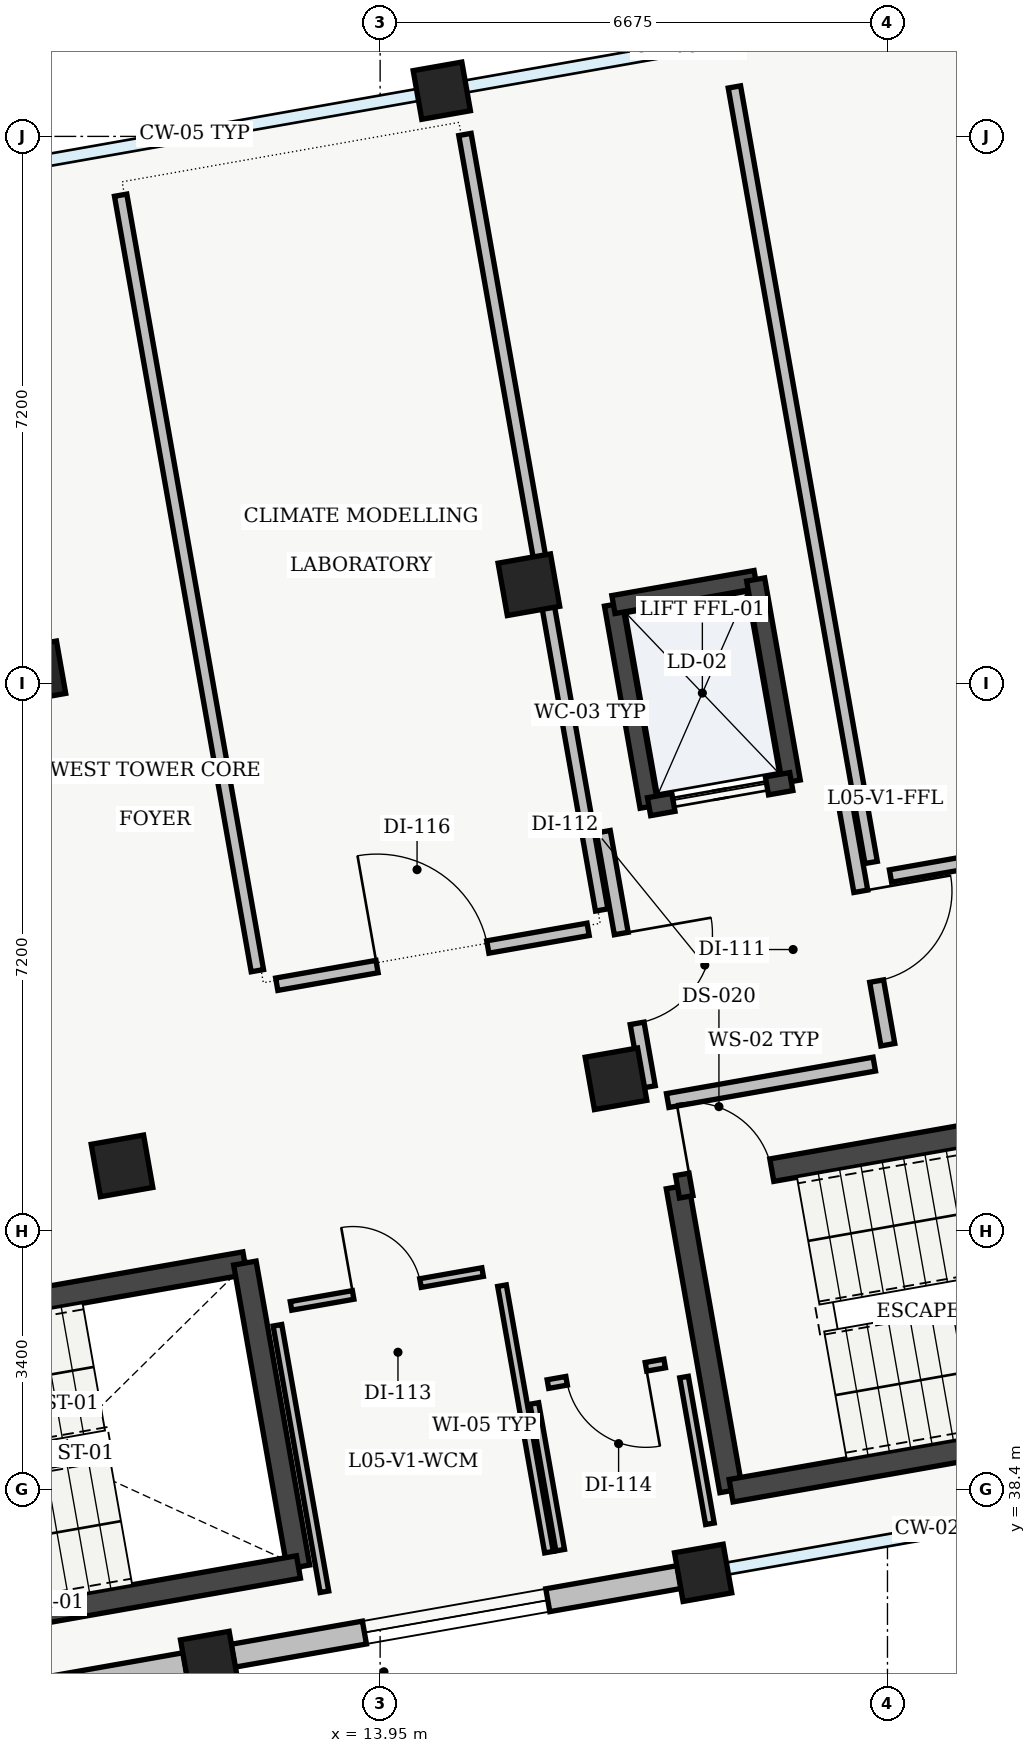
"""IFC4 building model, lengths in metres.
Left out: names, types, materials, properties, quantities, classifications, styles, units other than length and angle.
Written with IfcOpenShell. Run it as: python <this file> out.ifc"""

import sys

from ifc_helpers import new_model, si_unit, direction, frame, frame_2d, origin, origin_2d, place, context, subcontext, project, spatial, rectangle, extrude, element, fill, save


model = new_model("IFC4")
c1 = context("Model", 3, precision=1e-05, world=origin(), true_north=direction((0.0, 1.0)))
c2 = subcontext(c1, "Body", "Model", "MODEL_VIEW")
j1 = project(units=[si_unit("LENGTHUNIT", "METRE"), si_unit("PLANEANGLEUNIT", "RADIAN")], contexts=[c1])
p1 = place(None, origin())
s1 = spatial("IfcSite", under=j1, at=p1, CompositionType="ELEMENT")
p2 = place(p1, origin())
s2 = spatial("IfcBuilding", under=s1, at=p2, CompositionType="ELEMENT")
p3 = place(p2, frame((0.0, 0.0, 23.1)))
s3 = spatial("IfcBuildingStorey", under=s2, at=p3, CompositionType="ELEMENT", Elevation=23.1)
p4 = place(p3, frame((11.7, 36.156, 0.0), z_axis=(0.0, 0.0, 1.0), x_axis=(0.984807753012, 0.173648177667, 0.0)))
e1 = element("IfcColumn", 1, at=p4, inside=s3, PredefinedType="COLUMN", context=c2, shape_type="SweptSolid", body=[
    extrude(rectangle(XDim=0.65, YDim=0.65, at=origin_2d()), origin(), (0.0, 0.0, 1.0), 4.31),
])
for number, where, z_axis, x_axis in (
    (2, (10.554, 42.656, 0.0), (0.0, 0.0, 1.0), (0.985, 0.174, 0.0)),
    (3, (9.407, 49.156, 0.0), (0.0, 0.0, 1.0), (0.985, 0.174, 0.0)),
):
    element("IfcColumn", number, at=place(p3, frame(where, z_axis=z_axis, x_axis=x_axis)), inside=s3, PredefinedType="COLUMN", context=c2, shape_type="SweptSolid", body=[
        extrude(rectangle(XDim=0.7, YDim=0.7, at=origin_2d()), origin(), (0.0, 0.0, 1.0), 4.31),
    ])
p5 = place(p3, frame((18.199, 37.302, 0.0), z_axis=(0.0, 0.0, 1.0), x_axis=(0.984807753012, 0.173648177667, 0.0)))
e4 = element("IfcColumn", 4, at=p5, inside=s3, PredefinedType="COLUMN", context=c2, shape_type="SweptSolid", body=[
    extrude(rectangle(XDim=0.65, YDim=0.65, at=origin_2d()), origin(), (0.0, 0.0, 1.0), 4.31),
])
for number, where, z_axis, x_axis in (
    (5, (17.053, 43.802, 0.0), (0.0, 0.0, 1.0), (0.985, 0.174, 0.0)),
    (6, (15.907, 50.302, 0.0), (0.0, 0.0, 1.0), (0.985, 0.174, 0.0)),
):
    element("IfcColumn", number, at=place(p3, frame(where, z_axis=z_axis, x_axis=x_axis)), inside=s3, PredefinedType="COLUMN", context=c2, shape_type="SweptSolid", body=[
        extrude(rectangle(XDim=0.7, YDim=0.7, at=origin_2d()), origin(), (0.0, 0.0, 1.0), 4.31),
    ])
p6 = place(p3, frame((14.761, 56.801, 0.0), z_axis=(0.0, 0.0, 1.0), x_axis=(0.984807753012, 0.173648177667, 0.0)))
e7 = element("IfcColumn", 7, at=p6, inside=s3, PredefinedType="COLUMN", context=c2, shape_type="SweptSolid", body=[
    extrude(rectangle(XDim=0.65, YDim=0.65, at=origin_2d()), origin(), (0.0, 0.0, 1.0), 4.31),
])
p7 = place(p3, frame((17.884, 37.247, 0.0), z_axis=(0.0, 0.0, 1.0), x_axis=(-0.98480829201, -0.173645120828, 0.0)))
e8 = element("IfcWall", 8, at=p7, inside=s3, PredefinedType="STANDARD", context=c2, shape_type="SweptSolid", body=[
    extrude(rectangle(XDim=5.96, YDim=0.305, at=frame_2d((2.98, 0.0))), origin(), (0.0, 0.0, 1.0), 3.795),
])
p8 = place(p7, frame((1.755, 0.0, 0.95)))
e9 = element("IfcOpeningElement", 9, at=p8, cuts=e8, PredefinedType="OPENING", context=c2, shape_type="SweptSolid", body=[
    extrude(rectangle(XDim=2.45, YDim=1.38, at=frame_2d((1.225, 0.69))), frame((0.0, 0.152, 0.0), z_axis=(0.0, -1.0, 0.0), x_axis=(1.0, 0.0, 0.0)), (0.0, 0.0, 1.0), 0.305),
])
p9 = place(p3, frame((11.385, 36.101, 0.0), z_axis=(0.0, 0.0, 1.0), x_axis=(-0.98480829201, -0.173645120828, 0.0)))
e10 = element("IfcWall", 10, at=p9, inside=s3, PredefinedType="STANDARD", context=c2, shape_type="SweptSolid", body=[
    extrude(rectangle(XDim=5.96, YDim=0.305, at=frame_2d((2.98, 0.0))), origin(), (0.0, 0.0, 1.0), 3.795),
])
p10 = place(p3, frame((4.814, 40.08, 0.0), z_axis=(0.0, 0.0, 1.0), x_axis=(0.984802636214, 0.173677193974, 0.0)))
e11 = element("IfcWall", 11, at=p10, inside=s3, PredefinedType="SHEAR", context=c2, shape_type="SweptSolid", body=[
    extrude(rectangle(XDim=7.47, YDim=0.3, at=frame_2d((3.735, 0.0))), origin(), (0.0, 0.0, 1.0), 4.28),
])
p11 = place(p10, frame((0.18, 0.0, 0.0)))
e12 = element("IfcOpeningElement", 12, at=p11, cuts=e11, PredefinedType="OPENING", context=c2, shape_type="SweptSolid", body=[
    extrude(rectangle(XDim=1.18, YDim=2.15, at=frame_2d((0.59, 1.075))), frame((0.0, 0.15, 0.0), z_axis=(0.0, -1.0, 0.0), x_axis=(1.0, 0.0, 0.0)), (0.0, 0.0, 1.0), 0.3),
])
p12 = place(p3, frame((12.17, 41.377, 0.0), z_axis=(0.0, 0.0, 1.0), x_axis=(0.173654983803, -0.984806552883, 0.0)))
e13 = element("IfcWall", 13, at=p12, inside=s3, PredefinedType="SHEAR", context=c2, shape_type="SweptSolid", body=[
    extrude(rectangle(XDim=4.06, YDim=0.3, at=frame_2d((2.03, 0.0))), origin(), (0.0, 0.0, 1.0), 4.28),
])
p13 = place(p3, frame((12.875, 37.379, 0.0), z_axis=(0.0, 0.0, 1.0), x_axis=(-0.984808225754, -0.173645496596, 0.0)))
e14 = element("IfcWall", 14, at=p13, inside=s3, PredefinedType="SHEAR", context=c2, shape_type="SweptSolid", body=[
    extrude(rectangle(XDim=7.47, YDim=0.3, at=frame_2d((3.735, 0.0))), origin(), (0.0, 0.0, 1.0), 4.28),
])
p14 = place(p3, frame((18.567, 38.383, 0.0), z_axis=(0.0, 0.0, 1.0), x_axis=(-0.173606946886, 0.984815022221, 0.0)))
e15 = element("IfcWall", 15, at=p14, inside=s3, PredefinedType="SHEAR", context=c2, shape_type="SweptSolid", body=[
    extrude(rectangle(XDim=4.06, YDim=0.3, at=frame_2d((2.03, 0.0))), origin(), (0.0, 0.0, 1.0), 4.28),
])
p15 = place(p3, frame((17.863, 42.381, 0.0), z_axis=(0.0, 0.0, 1.0), x_axis=(0.984808225754, 0.173645496596, 0.0)))
e16 = element("IfcWall", 16, at=p15, inside=s3, PredefinedType="SHEAR", context=c2, shape_type="SweptSolid", body=[
    extrude(rectangle(XDim=7.47, YDim=0.3, at=frame_2d((3.735, 0.0))), origin(), (0.0, 0.0, 1.0), 4.28),
])
p16 = place(p15, frame((0.18, 0.0, 0.0)))
e17 = element("IfcOpeningElement", 17, at=p16, cuts=e16, PredefinedType="OPENING", context=c2, shape_type="SweptSolid", body=[
    extrude(rectangle(XDim=1.08, YDim=2.15, at=frame_2d((0.54, 1.075))), frame((0.0, 0.15, 0.0), z_axis=(0.0, -1.0, 0.0), x_axis=(1.0, 0.0, 0.0)), (0.0, 0.0, 1.0), 0.3),
])
p17 = place(p3, frame((25.924, 39.68, 0.0), z_axis=(0.0, 0.0, 1.0), x_axis=(-0.984809211193, -0.173639907711, 0.0)))
e18 = element("IfcWall", 18, at=p17, inside=s3, PredefinedType="SHEAR", context=c2, shape_type="SweptSolid", body=[
    extrude(rectangle(XDim=7.47, YDim=0.3, at=frame_2d((3.735, 0.0))), origin(), (0.0, 0.0, 1.0), 4.28),
])
p18 = place(p3, frame((17.488, 47.382, 0.0), z_axis=(0.0, 0.0, 1.0), x_axis=(-0.173615102578, 0.98481358447, 0.0)))
e19 = element("IfcWall", 19, at=p18, inside=s3, PredefinedType="SHEAR", context=c2, shape_type="SweptSolid", body=[
    extrude(rectangle(XDim=2.7, YDim=0.24, at=frame_2d((1.35, 0.0))), origin(), (0.0, 0.0, 1.0), 4.28),
])
p19 = place(p3, frame((17.02, 50.041, 0.0), z_axis=(0.0, 0.0, 1.0), x_axis=(0.984815882103, 0.173602068988, 0.0)))
e20 = element("IfcWall", 20, at=p19, inside=s3, PredefinedType="SHEAR", context=c2, shape_type="SweptSolid", body=[
    extrude(rectangle(XDim=1.9, YDim=0.24, at=frame_2d((0.95, 0.0))), origin(), (0.0, 0.0, 1.0), 4.28),
])
p20 = place(p3, frame((18.891, 50.371, 0.0), z_axis=(0.0, 0.0, 1.0), x_axis=(0.173615102578, -0.98481358447, 0.0)))
e21 = element("IfcWall", 21, at=p20, inside=s3, PredefinedType="SHEAR", context=c2, shape_type="SweptSolid", body=[
    extrude(rectangle(XDim=2.7, YDim=0.24, at=frame_2d((1.35, 0.0))), origin(), (0.0, 0.0, 1.0), 4.28),
])
p21 = place(p3, frame((19.359, 47.712, 0.0), z_axis=(0.0, 0.0, 1.0), x_axis=(-0.984815882103, -0.173602068988, 0.0)))
e22 = element("IfcWall", 22, at=p21, inside=s3, PredefinedType="SHEAR", context=c2, shape_type="SweptSolid", body=[
    extrude(rectangle(XDim=1.9, YDim=0.24, at=frame_2d((0.95, 0.0))), origin(), (0.0, 0.0, 1.0), 4.28),
])
p22 = place(p21, frame((0.325, 0.0, 0.0)))
e23 = element("IfcOpeningElement", 23, at=p22, cuts=e22, PredefinedType="OPENING", context=c2, shape_type="SweptSolid", body=[
    extrude(rectangle(XDim=1.25, YDim=2.2, at=frame_2d((0.625, 1.1))), frame((0.0, 0.12, 0.0), z_axis=(0.0, -1.0, 0.0), x_axis=(1.0, 0.0, 0.0)), (0.0, 0.0, 1.0), 0.24),
])
p23 = place(p3, frame((17.733, 43.516, 0.0), z_axis=(0.0, 0.0, 1.0), x_axis=(0.984808483292, 0.173644035992, 0.0)))
e24 = element("IfcWall", 24, at=p23, inside=s3, PredefinedType="SOLIDWALL", context=c2, shape_type="SweptSolid", body=[
    extrude(rectangle(XDim=2.76, YDim=0.185, at=frame_2d((1.38, 0.0))), origin(), (0.0, 0.0, 1.0), 3.95),
])
p24 = place(p3, frame((20.63, 44.25, 0.0), z_axis=(0.0, 0.0, 1.0), x_axis=(-0.173621956536, 0.984812376145, 0.0)))
e25 = element("IfcWall", 25, at=p24, inside=s3, PredefinedType="SOLIDWALL", context=c2, shape_type="SweptSolid", body=[
    extrude(rectangle(XDim=3.41, YDim=0.185, at=frame_2d((1.705, 0.0))), origin(), (0.0, 0.0, 1.0), 3.95),
])
p25 = place(p24, frame((0.85, 0.0, 0.0)))
e26 = element("IfcOpeningElement", 26, at=p25, cuts=e25, PredefinedType="OPENING", context=c2, shape_type="SweptSolid", body=[
    extrude(rectangle(XDim=1.2, YDim=2.15, at=frame_2d((0.6, 1.075))), frame((0.0, 0.093, 0.0), z_axis=(0.0, -1.0, 0.0), x_axis=(1.0, 0.0, 0.0)), (0.0, 0.0, 1.0), 0.185),
])
p26 = place(p3, frame((16.886, 47.052, 0.0), z_axis=(0.0, 0.0, 1.0), x_axis=(0.173621956536, -0.984812376145, 0.0)))
e27 = element("IfcWall", 27, at=p26, inside=s3, PredefinedType="SOLIDWALL", context=c2, shape_type="SweptSolid", body=[
    extrude(rectangle(XDim=3.41, YDim=0.185, at=frame_2d((1.705, 0.0))), origin(), (0.0, 0.0, 1.0), 3.95),
])
p27 = place(p26, frame((1.36, 0.0, 0.0)))
e28 = element("IfcOpeningElement", 28, at=p27, cuts=e27, PredefinedType="OPENING", context=c2, shape_type="SweptSolid", body=[
    extrude(rectangle(XDim=1.2, YDim=2.15, at=frame_2d((0.6, 1.075))), frame((0.0, 0.093, 0.0), z_axis=(0.0, -1.0, 0.0), x_axis=(1.0, 0.0, 0.0)), (0.0, 0.0, 1.0), 0.185),
])
p28 = place(p3, frame((16.171, 37.574, 0.0), z_axis=(0.0, 0.0, 1.0), x_axis=(-0.173644490041, 0.984808403233, 0.0)))
e29 = element("IfcWall", 29, at=p28, inside=s3, PredefinedType="PARTITIONING", context=c2, shape_type="SweptSolid", body=[
    extrude(rectangle(XDim=3.56, YDim=0.115, at=frame_2d((1.78, 0.0))), origin(), (0.0, 0.0, 1.0), 3.95),
])
p29 = place(p3, frame((15.298, 41.259, 0.0), z_axis=(0.0, 0.0, 1.0), x_axis=(-0.984803714572, -0.17367107924, 0.0)))
e30 = element("IfcWall", 30, at=p29, inside=s3, PredefinedType="PARTITIONING", context=c2, shape_type="SweptSolid", body=[
    extrude(rectangle(XDim=2.56, YDim=0.115, at=frame_2d((1.28, 0.0))), origin(), (0.0, 0.0, 1.0), 3.95),
])
p30 = place(p29, frame((0.83, 0.0, 0.0)))
e31 = element("IfcOpeningElement", 31, at=p30, cuts=e30, PredefinedType="OPENING", context=c2, shape_type="SweptSolid", body=[
    extrude(rectangle(XDim=0.9, YDim=2.1, at=frame_2d((0.45, 1.05))), frame((0.0, 0.058, 0.0), z_axis=(0.0, -1.0, 0.0), x_axis=(1.0, 0.0, 0.0)), (0.0, 0.0, 1.0), 0.115),
])
p31 = place(p3, frame((12.599, 40.559, 0.0), z_axis=(0.0, 0.0, 1.0), x_axis=(0.173644490041, -0.984808403233, 0.0)))
e32 = element("IfcWall", 32, at=p31, inside=s3, PredefinedType="PARTITIONING", context=c2, shape_type="SweptSolid", body=[
    extrude(rectangle(XDim=3.56, YDim=0.115, at=frame_2d((1.78, 0.0))), origin(), (0.0, 0.0, 1.0), 3.95),
])
p32 = place(p3, frame((18.289, 37.948, 0.0), z_axis=(0.0, 0.0, 1.0), x_axis=(-0.173643211285, 0.984808628706, 0.0)))
e33 = element("IfcWall", 33, at=p32, inside=s3, PredefinedType="PARTITIONING", context=c2, shape_type="SweptSolid", body=[
    extrude(rectangle(XDim=1.96, YDim=0.115, at=frame_2d((0.98, 0.0))), origin(), (0.0, 0.0, 1.0), 3.695),
])
p33 = place(p3, frame((17.694, 40.056, 0.0), z_axis=(0.0, 0.0, 1.0), x_axis=(-0.984797734253, -0.173704987291, 0.0)))
e34 = element("IfcWall", 34, at=p33, inside=s3, PredefinedType="PARTITIONING", context=c2, shape_type="SweptSolid", body=[
    extrude(rectangle(XDim=1.56, YDim=0.115, at=frame_2d((0.78, 0.0))), origin(), (0.0, 0.0, 1.0), 3.95),
])
p34 = place(p33, frame((0.25, 0.0, 0.0)))
e35 = element("IfcOpeningElement", 35, at=p34, cuts=e34, PredefinedType="OPENING", context=c2, shape_type="SweptSolid", body=[
    extrude(rectangle(XDim=1.06, YDim=2.12, at=frame_2d((0.53, 1.06))), frame((0.0, 0.058, 0.0), z_axis=(0.0, -1.0, 0.0), x_axis=(1.0, 0.0, 0.0)), (0.0, 0.0, 1.0), 0.115),
])
p35 = place(p3, frame((15.979, 39.53, 0.0), z_axis=(0.0, 0.0, 1.0), x_axis=(0.173643211285, -0.984808628706, 0.0)))
e36 = element("IfcWall", 36, at=p35, inside=s3, PredefinedType="PARTITIONING", context=c2, shape_type="SweptSolid", body=[
    extrude(rectangle(XDim=1.96, YDim=0.115, at=frame_2d((0.98, 0.0))), origin(), (0.0, 0.0, 1.0), 3.95),
])
p36 = place(p3, frame((12.59, 45.046, 0.0), z_axis=(0.0, 0.0, 1.0), x_axis=(0.984805411783, 0.173661454915, 0.0)))
e37 = element("IfcWall", 37, at=p36, inside=s3, PredefinedType="PARTITIONING", context=c2, shape_type="SweptSolid", body=[
    extrude(rectangle(XDim=4.16, YDim=0.165, at=frame_2d((2.08, 0.0))), origin(), (0.0, 0.0, 1.0), 3.845),
])
p37 = place(p36, frame((1.34, 0.0, 0.0)))
e38 = element("IfcOpeningElement", 38, at=p37, cuts=e37, PredefinedType="OPENING", context=c2, shape_type="SweptSolid", body=[
    extrude(rectangle(XDim=1.48, YDim=2.1, at=frame_2d((0.74, 1.05))), frame((0.0, 0.083, 0.0), z_axis=(0.0, -1.0, 0.0), x_axis=(1.0, 0.0, 0.0)), (0.0, 0.0, 1.0), 0.165),
])
p38 = place(p3, frame((16.865, 46.023, 0.0), z_axis=(0.0, 0.0, 1.0), x_axis=(-0.173632075677, 0.984810592092, 0.0)))
e39 = element("IfcWall", 39, at=p38, inside=s3, PredefinedType="PARTITIONING", context=c2, shape_type="SweptSolid", body=[
    extrude(rectangle(XDim=10.36, YDim=0.165, at=frame_2d((5.18, 0.0))), origin(), (0.0, 0.0, 1.0), 3.695),
])
p39 = place(p3, frame((10.536, 55.427, 0.0), z_axis=(0.0, 0.0, 1.0), x_axis=(0.173654930775, -0.984806562233, 0.0)))
e40 = element("IfcWall", 40, at=p39, inside=s3, PredefinedType="PARTITIONING", context=c2, shape_type="SweptSolid", body=[
    extrude(rectangle(XDim=10.36, YDim=0.165, at=frame_2d((5.18, 0.0))), origin(), (0.0, 0.0, 1.0), 3.95),
])
p40 = place(p3, frame((20.665, 46.469, 0.0), z_axis=(0.0, 0.0, 1.0), x_axis=(0.984804455571, 0.173666877348, 0.0)))
e41 = element("IfcWall", 41, at=p40, inside=s3, PredefinedType="PARTITIONING", context=c2, shape_type="SweptSolid", body=[
    extrude(rectangle(XDim=7.76, YDim=0.165, at=frame_2d((3.88, 0.0))), origin(), (0.0, 0.0, 1.0), 3.845),
])
p41 = place(p40, frame((3.125, 0.0, 0.0)))
e42 = element("IfcOpeningElement", 42, at=p41, cuts=e41, PredefinedType="OPENING", context=c2, shape_type="SweptSolid", body=[
    extrude(rectangle(XDim=1.51, YDim=2.12, at=frame_2d((0.755, 1.06))), frame((0.0, 0.083, 0.0), z_axis=(0.0, -1.0, 0.0), x_axis=(1.0, 0.0, 0.0)), (0.0, 0.0, 1.0), 0.165),
])
p42 = place(p3, frame((18.611, 56.851, 0.0), z_axis=(0.0, 0.0, 1.0), x_axis=(0.173654930775, -0.984806562233, 0.0)))
e43 = element("IfcWall", 43, at=p42, inside=s3, PredefinedType="PARTITIONING", context=c2, shape_type="SweptSolid", body=[
    extrude(rectangle(XDim=10.36, YDim=0.165, at=frame_2d((5.18, 0.0))), origin(), (0.0, 0.0, 1.0), 3.95),
])
p43 = place(p8, origin())
e44 = element("IfcWindow", 44, at=p43, inside=s3, PartitioningType="SINGLE_PANEL", PredefinedType="WINDOW", context=c2, shape_type="SweptSolid", body=[
    extrude(rectangle(XDim=2.45, YDim=1.38, at=frame_2d((1.225, 0.69))), frame((0.0, 0.03, 0.0), z_axis=(0.0, -1.0, 0.0), x_axis=(1.0, 0.0, 0.0)), (0.0, 0.0, 1.0), 0.06),
])
fill(e9, e44)
p44 = place(p16, origin())
e45 = element("IfcDoor", 45, at=p44, inside=s3, OperationType="SINGLE_SWING_LEFT", PredefinedType="DOOR", context=c2, shape_type="SweptSolid", body=[
    extrude(rectangle(XDim=1.08, YDim=2.15, at=frame_2d((0.54, 1.075))), frame((0.0, 0.025, 0.0), z_axis=(0.0, -1.0, 0.0), x_axis=(1.0, 0.0, 0.0)), (0.0, 0.0, 1.0), 0.05),
])
fill(e17, e45)
p45 = place(p22, origin())
e46 = element("IfcDoor", 46, at=p45, inside=s3, OperationType="SLIDING_TO_RIGHT", PredefinedType="DOOR", context=c2, shape_type="SweptSolid", body=[
    extrude(rectangle(XDim=1.25, YDim=2.2, at=frame_2d((0.625, 1.1))), frame((0.0, 0.025, 0.0), z_axis=(0.0, -1.0, 0.0), x_axis=(1.0, 0.0, 0.0)), (0.0, 0.0, 1.0), 0.05),
])
fill(e23, e46)
p46 = place(p25, origin())
e47 = element("IfcDoor", 47, at=p46, inside=s3, OperationType="SINGLE_SWING_RIGHT", PredefinedType="DOOR", context=c2, shape_type="SweptSolid", body=[
    extrude(rectangle(XDim=1.2, YDim=2.15, at=frame_2d((0.6, 1.075))), frame((0.0, 0.025, 0.0), z_axis=(0.0, -1.0, 0.0), x_axis=(1.0, 0.0, 0.0)), (0.0, 0.0, 1.0), 0.05),
])
fill(e26, e47)
p47 = place(p27, origin())
e48 = element("IfcDoor", 48, at=p47, inside=s3, OperationType="SINGLE_SWING_LEFT", PredefinedType="DOOR", context=c2, shape_type="SweptSolid", body=[
    extrude(rectangle(XDim=1.2, YDim=2.15, at=frame_2d((0.6, 1.075))), frame((0.0, 0.025, 0.0), z_axis=(0.0, -1.0, 0.0), x_axis=(1.0, 0.0, 0.0)), (0.0, 0.0, 1.0), 0.05),
])
fill(e28, e48)
p48 = place(p30, origin())
e49 = element("IfcDoor", 49, at=p48, inside=s3, OperationType="SINGLE_SWING_RIGHT", PredefinedType="DOOR", context=c2, shape_type="SweptSolid", body=[
    extrude(rectangle(XDim=0.9, YDim=2.1, at=frame_2d((0.45, 1.05))), frame((0.0, 0.025, 0.0), z_axis=(0.0, -1.0, 0.0), x_axis=(1.0, 0.0, 0.0)), (0.0, 0.0, 1.0), 0.05),
])
fill(e31, e49)
p49 = place(p34, origin())
e50 = element("IfcDoor", 50, at=p49, inside=s3, OperationType="SINGLE_SWING_LEFT", PredefinedType="DOOR", context=c2, shape_type="SweptSolid", body=[
    extrude(rectangle(XDim=1.06, YDim=2.12, at=frame_2d((0.53, 1.06))), frame((0.0, 0.025, 0.0), z_axis=(0.0, -1.0, 0.0), x_axis=(1.0, 0.0, 0.0)), (0.0, 0.0, 1.0), 0.05),
])
fill(e35, e50)
p50 = place(p37, origin())
e51 = element("IfcDoor", 51, at=p50, inside=s3, OperationType="SINGLE_SWING_LEFT", PredefinedType="DOOR", context=c2, shape_type="SweptSolid", body=[
    extrude(rectangle(XDim=1.48, YDim=2.1, at=frame_2d((0.74, 1.05))), frame((0.0, 0.025, 0.0), z_axis=(0.0, -1.0, 0.0), x_axis=(1.0, 0.0, 0.0)), (0.0, 0.0, 1.0), 0.05),
])
fill(e38, e51)
save(model, sys.argv[1])
